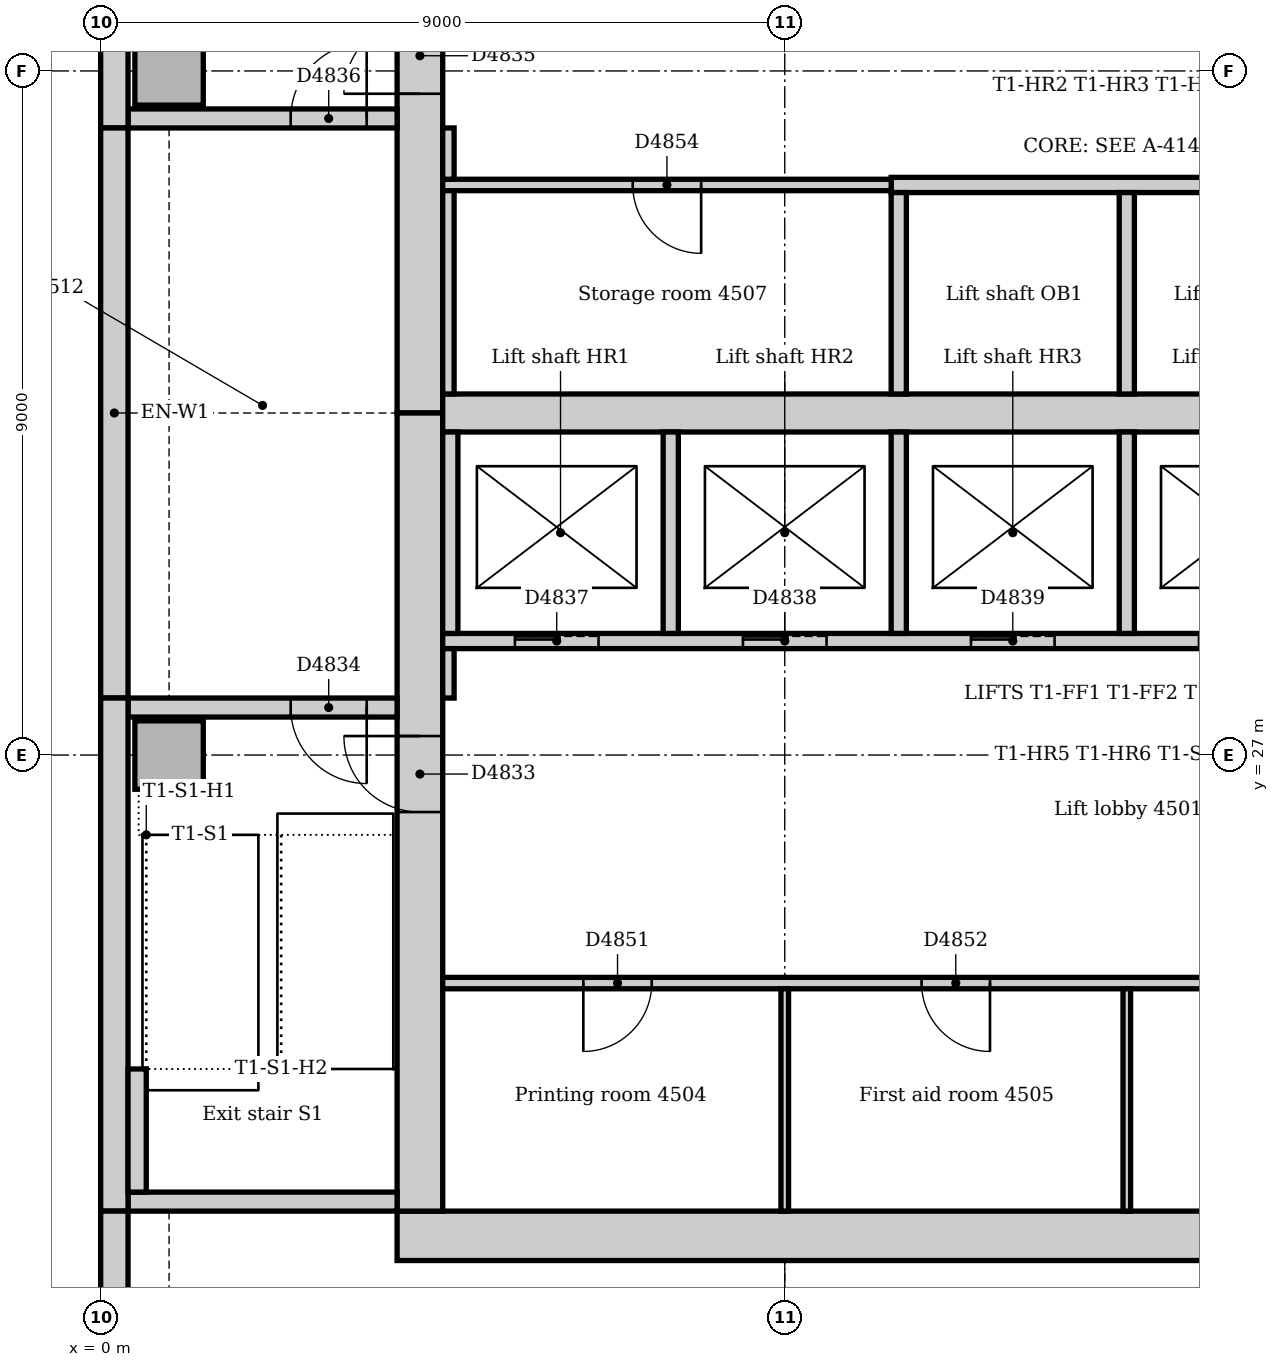
"""IFC4 building model, lengths in metres.
Left out: names, types, materials, properties, quantities, classifications, styles, units other than length and angle.
Written with IfcOpenShell. Run it as: python <this file> out.ifc"""

import sys

from ifc_helpers import new_model, si_unit, direction, frame, frame_2d, origin, origin_2d, place, context, subcontext, project, spatial, rectangle, extrude, element, fill, save


model = new_model("IFC4")
c1 = context("Model", 3, precision=1e-05, world=origin(), true_north=direction((0.0, 1.0)))
c2 = subcontext(c1, "Body", "Model", "MODEL_VIEW")
j1 = project(units=[si_unit("LENGTHUNIT", "METRE"), si_unit("PLANEANGLEUNIT", "RADIAN")], contexts=[c1])
p1 = place(None, origin())
s1 = spatial("IfcSite", under=j1, at=p1, CompositionType="ELEMENT")
p2 = place(p1, origin())
s2 = spatial("IfcBuilding", under=s1, at=p2, CompositionType="ELEMENT")
p3 = place(p2, frame((0.0, 0.0, 189.0)))
s3 = spatial("IfcBuildingStorey", under=s2, at=p3, CompositionType="ELEMENT", Elevation=189.0)
p4 = place(p3, frame((3.9, 20.675, 0.0), z_axis=(0.0, 0.0, 1.0), x_axis=(1.0, 0.0, 0.0)))
e1 = element("IfcWall", 1, at=p4, inside=s3, PredefinedType="SOLIDWALL", context=c2, shape_type="SweptSolid", body=[
    extrude(rectangle(XDim=19.25, YDim=0.65, at=frame_2d((9.625, 0.0))), origin(), (0.0, 0.0, 1.0), 4.0),
])
p5 = place(p3, frame((4.2, 42.0, 0.0), z_axis=(0.0, 0.0, 1.0), x_axis=(0.0, -1.0, 0.0)))
e2 = element("IfcWall", 2, at=p5, inside=s3, PredefinedType="SOLIDWALL", context=c2, shape_type="SweptSolid", body=[
    extrude(rectangle(XDim=10.5, YDim=0.6, at=frame_2d((5.25, 0.0))), origin(), (0.0, 0.0, 1.0), 4.0),
])
p6 = place(p5, frame((5.3, 0.0, 0.0)))
e3 = element("IfcOpeningElement", 3, at=p6, cuts=e2, PredefinedType="OPENING", context=c2, shape_type="SweptSolid", body=[
    extrude(rectangle(XDim=1.0, YDim=2.1, at=frame_2d((0.5, 1.05))), frame((0.0, 0.31, 0.0), z_axis=(0.0, -1.0, 0.0), x_axis=(1.0, 0.0, 0.0)), (0.0, 0.0, 1.0), 0.62),
])
p7 = place(p3, frame((4.2, 31.5, 0.0), z_axis=(0.0, 0.0, 1.0), x_axis=(0.0, -1.0, 0.0)))
e4 = element("IfcWall", 4, at=p7, inside=s3, PredefinedType="SOLIDWALL", context=c2, shape_type="SweptSolid", body=[
    extrude(rectangle(XDim=10.5, YDim=0.6, at=frame_2d((5.25, 0.0))), origin(), (0.0, 0.0, 1.0), 4.0),
])
p8 = place(p7, frame((4.25, 0.0, 0.0)))
e5 = element("IfcOpeningElement", 5, at=p8, cuts=e4, PredefinedType="OPENING", context=c2, shape_type="SweptSolid", body=[
    extrude(rectangle(XDim=1.0, YDim=2.1, at=frame_2d((0.5, 1.05))), frame((0.0, 0.31, 0.0), z_axis=(0.0, -1.0, 0.0), x_axis=(1.0, 0.0, 0.0)), (0.0, 0.0, 1.0), 0.62),
])
p9 = place(p3, frame((4.5, 31.5, 0.0), z_axis=(0.0, 0.0, 1.0), x_axis=(1.0, 0.0, 0.0)))
e6 = element("IfcWall", 6, at=p9, inside=s3, PredefinedType="SOLIDWALL", context=c2, shape_type="SweptSolid", body=[
    extrude(rectangle(XDim=18.0, YDim=0.5, at=frame_2d((9.0, 0.0))), origin(), (0.0, 0.0, 1.0), 4.0),
])
p10 = place(p3, frame((0.36, 21.125, 0.0), z_axis=(0.0, 0.0, 1.0), x_axis=(1.0, 0.0, 0.0)))
e7 = element("IfcWall", 7, at=p10, inside=s3, PredefinedType="SOLIDWALL", context=c2, shape_type="SweptSolid", body=[
    extrude(rectangle(XDim=3.54, YDim=0.25, at=frame_2d((1.77, 0.0))), origin(), (0.0, 0.0, 1.0), 4.0),
])
p11 = place(p3, frame((3.9, 27.625, 0.0), z_axis=(0.0, 0.0, 1.0), x_axis=(-1.0, 0.0, 0.0)))
e8 = element("IfcWall", 8, at=p11, inside=s3, PredefinedType="SOLIDWALL", context=c2, shape_type="SweptSolid", body=[
    extrude(rectangle(XDim=3.54, YDim=0.25, at=frame_2d((1.77, 0.0))), origin(), (0.0, 0.0, 1.0), 4.0),
])
p12 = place(p11, frame((0.4, 0.0, 0.0)))
e9 = element("IfcOpeningElement", 9, at=p12, cuts=e8, PredefinedType="OPENING", context=c2, shape_type="SweptSolid", body=[
    extrude(rectangle(XDim=1.0, YDim=2.1, at=frame_2d((0.5, 1.05))), frame((0.0, 0.135, 0.0), z_axis=(0.0, -1.0, 0.0), x_axis=(1.0, 0.0, 0.0)), (0.0, 0.0, 1.0), 0.27),
])
p13 = place(p3, frame((0.36, 35.375, 0.0), z_axis=(0.0, 0.0, 1.0), x_axis=(1.0, 0.0, 0.0)))
e10 = element("IfcWall", 10, at=p13, inside=s3, PredefinedType="SOLIDWALL", context=c2, shape_type="SweptSolid", body=[
    extrude(rectangle(XDim=3.54, YDim=0.25, at=frame_2d((1.77, 0.0))), origin(), (0.0, 0.0, 1.0), 4.0),
])
p14 = place(p13, frame((2.14, 0.0, 0.0)))
e11 = element("IfcOpeningElement", 11, at=p14, cuts=e10, PredefinedType="OPENING", context=c2, shape_type="SweptSolid", body=[
    extrude(rectangle(XDim=1.0, YDim=2.1, at=frame_2d((0.5, 1.05))), frame((0.0, 0.135, 0.0), z_axis=(0.0, -1.0, 0.0), x_axis=(1.0, 0.0, 0.0)), (0.0, 0.0, 1.0), 0.27),
])
for number, where, z_axis, x_axis in (
    (12, (0.9, 27.0, 0.0), (0.0, 0.0, 1.0), (1.0, 0.0, 0.0)),
    (13, (0.9, 36.0, 0.0), (0.0, 0.0, 1.0), (1.0, 0.0, 0.0)),
):
    element("IfcColumn", number, at=place(p3, frame(where, z_axis=z_axis, x_axis=x_axis)), inside=s3, PredefinedType="COLUMN", context=c2, shape_type="SweptSolid", body=[
        extrude(rectangle(XDim=0.9, YDim=0.9, at=origin_2d()), origin(), (0.0, 0.0, 1.0), 4.0),
    ])
p15 = place(p3, frame((0.18, 42.0, 0.0), z_axis=(0.0, 0.0, 1.0), x_axis=(0.0, -1.0, 0.0)))
e14 = element("IfcWall", 14, at=p15, inside=s3, PredefinedType="STANDARD", context=c2, shape_type="SweptSolid", body=[
    extrude(rectangle(XDim=6.75, YDim=0.36, at=frame_2d((3.375, 0.0))), origin(), (0.0, 0.0, 1.0), 3.7),
])
p16 = place(p3, frame((0.18, 35.25, 0.0), z_axis=(0.0, 0.0, 1.0), x_axis=(0.0, -1.0, 0.0)))
e15 = element("IfcWall", 15, at=p16, inside=s3, PredefinedType="STANDARD", context=c2, shape_type="SweptSolid", body=[
    extrude(rectangle(XDim=7.5, YDim=0.36, at=frame_2d((3.75, 0.0))), origin(), (0.0, 0.0, 1.0), 3.7),
])
p17 = place(p3, frame((0.18, 27.75, 0.0), z_axis=(0.0, 0.0, 1.0), x_axis=(0.0, -1.0, 0.0)))
e16 = element("IfcWall", 16, at=p17, inside=s3, PredefinedType="STANDARD", context=c2, shape_type="SweptSolid", body=[
    extrude(rectangle(XDim=6.75, YDim=0.36, at=frame_2d((3.375, 0.0))), origin(), (0.0, 0.0, 1.0), 3.7),
])
p18 = place(p3, frame((0.18, 21.0, 0.0), z_axis=(0.0, 0.0, 1.0), x_axis=(0.0, -1.0, 0.0)))
e17 = element("IfcWall", 17, at=p18, inside=s3, PredefinedType="STANDARD", context=c2, shape_type="SweptSolid", body=[
    extrude(rectangle(XDim=7.757, YDim=0.36, at=frame_2d((3.879, 0.0))), origin(), (0.0, 0.0, 1.0), 3.7),
])
p19 = place(p18, frame((1.35, 0.0, 0.9)))
e18 = element("IfcOpeningElement", 18, at=p19, cuts=e17, PredefinedType="OPENING", context=c2, shape_type="SweptSolid", body=[
    extrude(rectangle(XDim=3.3, YDim=1.6, at=frame_2d((1.65, 0.8))), frame((0.0, 0.19, 0.0), z_axis=(0.0, -1.0, 0.0), x_axis=(1.0, 0.0, 0.0)), (0.0, 0.0, 1.0), 0.38),
])
p20 = place(p3, frame((0.48, 21.25, 0.0), z_axis=(0.0, 0.0, 1.0), x_axis=(0.0, 1.0, 0.0)))
e19 = element("IfcWall", 19, at=p20, inside=s3, PredefinedType="STANDARD", context=c2, shape_type="SweptSolid", body=[
    extrude(rectangle(XDim=1.62, YDim=0.24, at=frame_2d((0.81, 0.0))), origin(), (0.0, 0.0, 1.0), 4.0),
])
p21 = place(p3, frame((4.5, 28.5, 0.0), z_axis=(0.0, 0.0, 1.0), x_axis=(1.0, 0.0, 0.0)))
e20 = element("IfcWall", 20, at=p21, inside=s3, PredefinedType="PARTITIONING", context=c2, shape_type="SweptSolid", body=[
    extrude(rectangle(XDim=18.0, YDim=0.2, at=frame_2d((9.0, 0.0))), origin(), (0.0, 0.0, 1.0), 3.7),
])
p22 = place(p21, frame((0.95, 0.0, 0.0)))
e21 = element("IfcOpeningElement", 21, at=p22, cuts=e20, PredefinedType="OPENING", context=c2, shape_type="SweptSolid", body=[
    extrude(rectangle(XDim=1.1, YDim=2.1, at=frame_2d((0.55, 1.05))), frame((0.0, 0.11, 0.0), z_axis=(0.0, -1.0, 0.0), x_axis=(1.0, 0.0, 0.0)), (0.0, 0.0, 1.0), 0.22),
])
p23 = place(p21, frame((3.95, 0.0, 0.0)))
e22 = element("IfcOpeningElement", 22, at=p23, cuts=e20, PredefinedType="OPENING", context=c2, shape_type="SweptSolid", body=[
    extrude(rectangle(XDim=1.1, YDim=2.1, at=frame_2d((0.55, 1.05))), frame((0.0, 0.11, 0.0), z_axis=(0.0, -1.0, 0.0), x_axis=(1.0, 0.0, 0.0)), (0.0, 0.0, 1.0), 0.22),
])
p24 = place(p21, frame((6.95, 0.0, 0.0)))
e23 = element("IfcOpeningElement", 23, at=p24, cuts=e20, PredefinedType="OPENING", context=c2, shape_type="SweptSolid", body=[
    extrude(rectangle(XDim=1.1, YDim=2.1, at=frame_2d((0.55, 1.05))), frame((0.0, 0.11, 0.0), z_axis=(0.0, -1.0, 0.0), x_axis=(1.0, 0.0, 0.0)), (0.0, 0.0, 1.0), 0.22),
])
p25 = place(p21, frame((9.95, 0.0, 0.0)))
e24 = element("IfcOpeningElement", 24, at=p25, cuts=e20, PredefinedType="OPENING", context=c2, shape_type="SweptSolid", body=[
    extrude(rectangle(XDim=1.1, YDim=2.1, at=frame_2d((0.55, 1.05))), frame((0.0, 0.11, 0.0), z_axis=(0.0, -1.0, 0.0), x_axis=(1.0, 0.0, 0.0)), (0.0, 0.0, 1.0), 0.22),
])
p26 = place(p21, frame((12.95, 0.0, 0.0)))
e25 = element("IfcOpeningElement", 25, at=p26, cuts=e20, PredefinedType="OPENING", context=c2, shape_type="SweptSolid", body=[
    extrude(rectangle(XDim=1.1, YDim=2.1, at=frame_2d((0.55, 1.05))), frame((0.0, 0.11, 0.0), z_axis=(0.0, -1.0, 0.0), x_axis=(1.0, 0.0, 0.0)), (0.0, 0.0, 1.0), 0.22),
])
p27 = place(p21, frame((15.95, 0.0, 0.0)))
e26 = element("IfcOpeningElement", 26, at=p27, cuts=e20, PredefinedType="OPENING", context=c2, shape_type="SweptSolid", body=[
    extrude(rectangle(XDim=1.1, YDim=2.1, at=frame_2d((0.55, 1.05))), frame((0.0, 0.11, 0.0), z_axis=(0.0, -1.0, 0.0), x_axis=(1.0, 0.0, 0.0)), (0.0, 0.0, 1.0), 0.22),
])
p28 = place(p3, frame((10.4, 34.5, 0.0), z_axis=(0.0, 0.0, 1.0), x_axis=(1.0, 0.0, 0.0)))
e27 = element("IfcWall", 27, at=p28, inside=s3, PredefinedType="PARTITIONING", context=c2, shape_type="SweptSolid", body=[
    extrude(rectangle(XDim=12.1, YDim=0.2, at=frame_2d((6.05, 0.0))), origin(), (0.0, 0.0, 1.0), 3.7),
])
p29 = place(p28, frame((7.05, 0.0, 0.0)))
e28 = element("IfcOpeningElement", 28, at=p29, cuts=e27, PredefinedType="OPENING", context=c2, shape_type="SweptSolid", body=[
    extrude(rectangle(XDim=1.1, YDim=2.1, at=frame_2d((0.55, 1.05))), frame((0.0, 0.11, 0.0), z_axis=(0.0, -1.0, 0.0), x_axis=(1.0, 0.0, 0.0)), (0.0, 0.0, 1.0), 0.22),
])
p30 = place(p28, frame((10.05, 0.0, 0.0)))
e29 = element("IfcOpeningElement", 29, at=p30, cuts=e27, PredefinedType="OPENING", context=c2, shape_type="SweptSolid", body=[
    extrude(rectangle(XDim=1.1, YDim=2.1, at=frame_2d((0.55, 1.05))), frame((0.0, 0.11, 0.0), z_axis=(0.0, -1.0, 0.0), x_axis=(1.0, 0.0, 0.0)), (0.0, 0.0, 1.0), 0.22),
])
for number, where, z_axis, x_axis in (
    (30, (10.5, 28.6, 0.0), (0.0, 0.0, 1.0), (0.0, 1.0, 0.0)),
    (31, (10.5, 31.75, 0.0), (0.0, 0.0, 1.0), (0.0, 1.0, 0.0)),
    (32, (13.5, 28.6, 0.0), (0.0, 0.0, 1.0), (0.0, 1.0, 0.0)),
    (33, (13.5, 31.75, 0.0), (0.0, 0.0, 1.0), (0.0, 1.0, 0.0)),
    (34, (4.6, 28.6, 0.0), (0.0, 0.0, 1.0), (0.0, 1.0, 0.0)),
    (35, (7.5, 28.6, 0.0), (0.0, 0.0, 1.0), (0.0, 1.0, 0.0)),
):
    element("IfcWall", number, at=place(p3, frame(where, z_axis=z_axis, x_axis=x_axis)), inside=s3, PredefinedType="PARTITIONING", context=c2, shape_type="SweptSolid", body=[
        extrude(rectangle(XDim=2.65, YDim=0.2, at=frame_2d((1.325, 0.0))), origin(), (0.0, 0.0, 1.0), 3.7),
    ])
p31 = place(p3, frame((4.5, 24.0, 0.0), z_axis=(0.0, 0.0, 1.0), x_axis=(1.0, 0.0, 0.0)))
e36 = element("IfcWall", 36, at=p31, inside=s3, PredefinedType="PARTITIONING", context=c2, shape_type="SweptSolid", body=[
    extrude(rectangle(XDim=18.0, YDim=0.15, at=frame_2d((9.0, 0.0))), origin(), (0.0, 0.0, 1.0), 3.7),
])
p32 = place(p31, frame((1.85, 0.0, 0.0)))
e37 = element("IfcOpeningElement", 37, at=p32, cuts=e36, PredefinedType="OPENING", context=c2, shape_type="SweptSolid", body=[
    extrude(rectangle(XDim=0.9, YDim=2.1, at=frame_2d((0.45, 1.05))), frame((0.0, 0.085, 0.0), z_axis=(0.0, -1.0, 0.0), x_axis=(1.0, 0.0, 0.0)), (0.0, 0.0, 1.0), 0.17),
])
p33 = place(p31, frame((6.3, 0.0, 0.0)))
e38 = element("IfcOpeningElement", 38, at=p33, cuts=e36, PredefinedType="OPENING", context=c2, shape_type="SweptSolid", body=[
    extrude(rectangle(XDim=0.9, YDim=2.1, at=frame_2d((0.45, 1.05))), frame((0.0, 0.085, 0.0), z_axis=(0.0, -1.0, 0.0), x_axis=(1.0, 0.0, 0.0)), (0.0, 0.0, 1.0), 0.17),
])
p34 = place(p31, frame((12.95, 0.0, 0.0)))
e39 = element("IfcOpeningElement", 39, at=p34, cuts=e36, PredefinedType="OPENING", context=c2, shape_type="SweptSolid", body=[
    extrude(rectangle(XDim=0.9, YDim=2.1, at=frame_2d((0.45, 1.05))), frame((0.0, 0.085, 0.0), z_axis=(0.0, -1.0, 0.0), x_axis=(1.0, 0.0, 0.0)), (0.0, 0.0, 1.0), 0.17),
])
p35 = place(p3, frame((4.5, 34.5, 0.0), z_axis=(0.0, 0.0, 1.0), x_axis=(1.0, 0.0, 0.0)))
e40 = element("IfcWall", 40, at=p35, inside=s3, PredefinedType="PARTITIONING", context=c2, shape_type="SweptSolid", body=[
    extrude(rectangle(XDim=5.9, YDim=0.15, at=frame_2d((2.95, 0.0))), origin(), (0.0, 0.0, 1.0), 3.7),
])
p36 = place(p35, frame((2.5, 0.0, 0.0)))
e41 = element("IfcOpeningElement", 41, at=p36, cuts=e40, PredefinedType="OPENING", context=c2, shape_type="SweptSolid", body=[
    extrude(rectangle(XDim=0.9, YDim=2.1, at=frame_2d((0.45, 1.05))), frame((0.0, 0.085, 0.0), z_axis=(0.0, -1.0, 0.0), x_axis=(1.0, 0.0, 0.0)), (0.0, 0.0, 1.0), 0.17),
])
p37 = place(p3, frame((4.575, 34.575, 0.0), z_axis=(0.0, 0.0, 1.0), x_axis=(0.0, 1.0, 0.0)))
e42 = element("IfcWall", 42, at=p37, inside=s3, PredefinedType="PARTITIONING", context=c2, shape_type="SweptSolid", body=[
    extrude(rectangle(XDim=0.675, YDim=0.15, at=frame_2d((0.338, 0.0))), origin(), (0.0, 0.0, 1.0), 3.7),
])
p38 = place(p3, frame((4.575, 31.75, 0.0), z_axis=(0.0, 0.0, 1.0), x_axis=(0.0, 1.0, 0.0)))
e43 = element("IfcWall", 43, at=p38, inside=s3, PredefinedType="PARTITIONING", context=c2, shape_type="SweptSolid", body=[
    extrude(rectangle(XDim=2.675, YDim=0.15, at=frame_2d((1.337, 0.0))), origin(), (0.0, 0.0, 1.0), 3.7),
])
p39 = place(p3, frame((4.575, 27.75, 0.0), z_axis=(0.0, 0.0, 1.0), x_axis=(0.0, 1.0, 0.0)))
e44 = element("IfcWall", 44, at=p39, inside=s3, PredefinedType="PARTITIONING", context=c2, shape_type="SweptSolid", body=[
    extrude(rectangle(XDim=0.65, YDim=0.15, at=frame_2d((0.325, 0.0))), origin(), (0.0, 0.0, 1.0), 3.7),
])
for number, where, z_axis, x_axis in (
    (45, (9.0, 21.0, 0.0), (0.0, 0.0, 1.0), (0.0, 1.0, 0.0)),
    (46, (13.5, 21.0, 0.0), (0.0, 0.0, 1.0), (0.0, 1.0, 0.0)),
):
    element("IfcWall", number, at=place(p3, frame(where, z_axis=z_axis, x_axis=x_axis)), inside=s3, PredefinedType="PARTITIONING", context=c2, shape_type="SweptSolid", body=[
        extrude(rectangle(XDim=2.925, YDim=0.1, at=frame_2d((1.462, 0.0))), origin(), (0.0, 0.0, 1.0), 3.7),
    ])
p40 = place(p8, frame((1.0, 0.0, 0.0), z_axis=(0.0, 0.0, 1.0), x_axis=(-1.0, 0.0, 0.0)))
e47 = element("IfcDoor", 47, at=p40, inside=s3, OperationType="SINGLE_SWING_RIGHT", PredefinedType="DOOR", context=c2, shape_type="SweptSolid", body=[
    extrude(rectangle(XDim=1.0, YDim=2.1, at=frame_2d((0.5, 1.05))), frame((0.0, 0.025, 0.0), z_axis=(0.0, -1.0, 0.0), x_axis=(1.0, 0.0, 0.0)), (0.0, 0.0, 1.0), 0.05),
])
fill(e5, e47)
p41 = place(p12, origin())
e48 = element("IfcDoor", 48, at=p41, inside=s3, OperationType="SINGLE_SWING_LEFT", PredefinedType="DOOR", context=c2, shape_type="SweptSolid", body=[
    extrude(rectangle(XDim=1.0, YDim=2.1, at=frame_2d((0.5, 1.05))), frame((0.0, 0.025, 0.0), z_axis=(0.0, -1.0, 0.0), x_axis=(1.0, 0.0, 0.0)), (0.0, 0.0, 1.0), 0.05),
])
fill(e9, e48)
p42 = place(p6, frame((1.0, 0.0, 0.0), z_axis=(0.0, 0.0, 1.0), x_axis=(-1.0, 0.0, 0.0)))
e49 = element("IfcDoor", 49, at=p42, inside=s3, OperationType="SINGLE_SWING_LEFT", PredefinedType="DOOR", context=c2, shape_type="SweptSolid", body=[
    extrude(rectangle(XDim=1.0, YDim=2.1, at=frame_2d((0.5, 1.05))), frame((0.0, 0.025, 0.0), z_axis=(0.0, -1.0, 0.0), x_axis=(1.0, 0.0, 0.0)), (0.0, 0.0, 1.0), 0.05),
])
fill(e3, e49)
p43 = place(p14, origin())
e50 = element("IfcDoor", 50, at=p43, inside=s3, OperationType="SINGLE_SWING_RIGHT", PredefinedType="DOOR", context=c2, shape_type="SweptSolid", body=[
    extrude(rectangle(XDim=1.0, YDim=2.1, at=frame_2d((0.5, 1.05))), frame((0.0, 0.025, 0.0), z_axis=(0.0, -1.0, 0.0), x_axis=(1.0, 0.0, 0.0)), (0.0, 0.0, 1.0), 0.05),
])
fill(e11, e50)
p44 = place(p22, origin())
e51 = element("IfcDoor", 51, at=p44, inside=s3, OperationType="SLIDING_TO_LEFT", PredefinedType="DOOR", context=c2, shape_type="SweptSolid", body=[
    extrude(rectangle(XDim=1.1, YDim=2.1, at=frame_2d((0.55, 1.05))), frame((0.0, 0.025, 0.0), z_axis=(0.0, -1.0, 0.0), x_axis=(1.0, 0.0, 0.0)), (0.0, 0.0, 1.0), 0.05),
])
fill(e21, e51)
p45 = place(p23, origin())
e52 = element("IfcDoor", 52, at=p45, inside=s3, OperationType="SLIDING_TO_LEFT", PredefinedType="DOOR", context=c2, shape_type="SweptSolid", body=[
    extrude(rectangle(XDim=1.1, YDim=2.1, at=frame_2d((0.55, 1.05))), frame((0.0, 0.025, 0.0), z_axis=(0.0, -1.0, 0.0), x_axis=(1.0, 0.0, 0.0)), (0.0, 0.0, 1.0), 0.05),
])
fill(e22, e52)
p46 = place(p24, origin())
e53 = element("IfcDoor", 53, at=p46, inside=s3, OperationType="SLIDING_TO_LEFT", PredefinedType="DOOR", context=c2, shape_type="SweptSolid", body=[
    extrude(rectangle(XDim=1.1, YDim=2.1, at=frame_2d((0.55, 1.05))), frame((0.0, 0.025, 0.0), z_axis=(0.0, -1.0, 0.0), x_axis=(1.0, 0.0, 0.0)), (0.0, 0.0, 1.0), 0.05),
])
fill(e23, e53)
p47 = place(p32, frame((0.9, 0.0, 0.0), z_axis=(0.0, 0.0, 1.0), x_axis=(-1.0, 0.0, 0.0)))
e54 = element("IfcDoor", 54, at=p47, inside=s3, OperationType="SINGLE_SWING_RIGHT", PredefinedType="DOOR", context=c2, shape_type="SweptSolid", body=[
    extrude(rectangle(XDim=0.9, YDim=2.1, at=frame_2d((0.45, 1.05))), frame((0.0, 0.025, 0.0), z_axis=(0.0, -1.0, 0.0), x_axis=(1.0, 0.0, 0.0)), (0.0, 0.0, 1.0), 0.05),
])
fill(e37, e54)
p48 = place(p33, frame((0.9, 0.0, 0.0), z_axis=(0.0, 0.0, 1.0), x_axis=(-1.0, 0.0, 0.0)))
e55 = element("IfcDoor", 55, at=p48, inside=s3, OperationType="SINGLE_SWING_LEFT", PredefinedType="DOOR", context=c2, shape_type="SweptSolid", body=[
    extrude(rectangle(XDim=0.9, YDim=2.1, at=frame_2d((0.45, 1.05))), frame((0.0, 0.025, 0.0), z_axis=(0.0, -1.0, 0.0), x_axis=(1.0, 0.0, 0.0)), (0.0, 0.0, 1.0), 0.05),
])
fill(e38, e55)
p49 = place(p36, frame((0.9, 0.0, 0.0), z_axis=(0.0, 0.0, 1.0), x_axis=(-1.0, 0.0, 0.0)))
e56 = element("IfcDoor", 56, at=p49, inside=s3, OperationType="SINGLE_SWING_LEFT", PredefinedType="DOOR", context=c2, shape_type="SweptSolid", body=[
    extrude(rectangle(XDim=0.9, YDim=2.1, at=frame_2d((0.45, 1.05))), frame((0.0, 0.025, 0.0), z_axis=(0.0, -1.0, 0.0), x_axis=(1.0, 0.0, 0.0)), (0.0, 0.0, 1.0), 0.05),
])
fill(e41, e56)
save(model, sys.argv[1])
